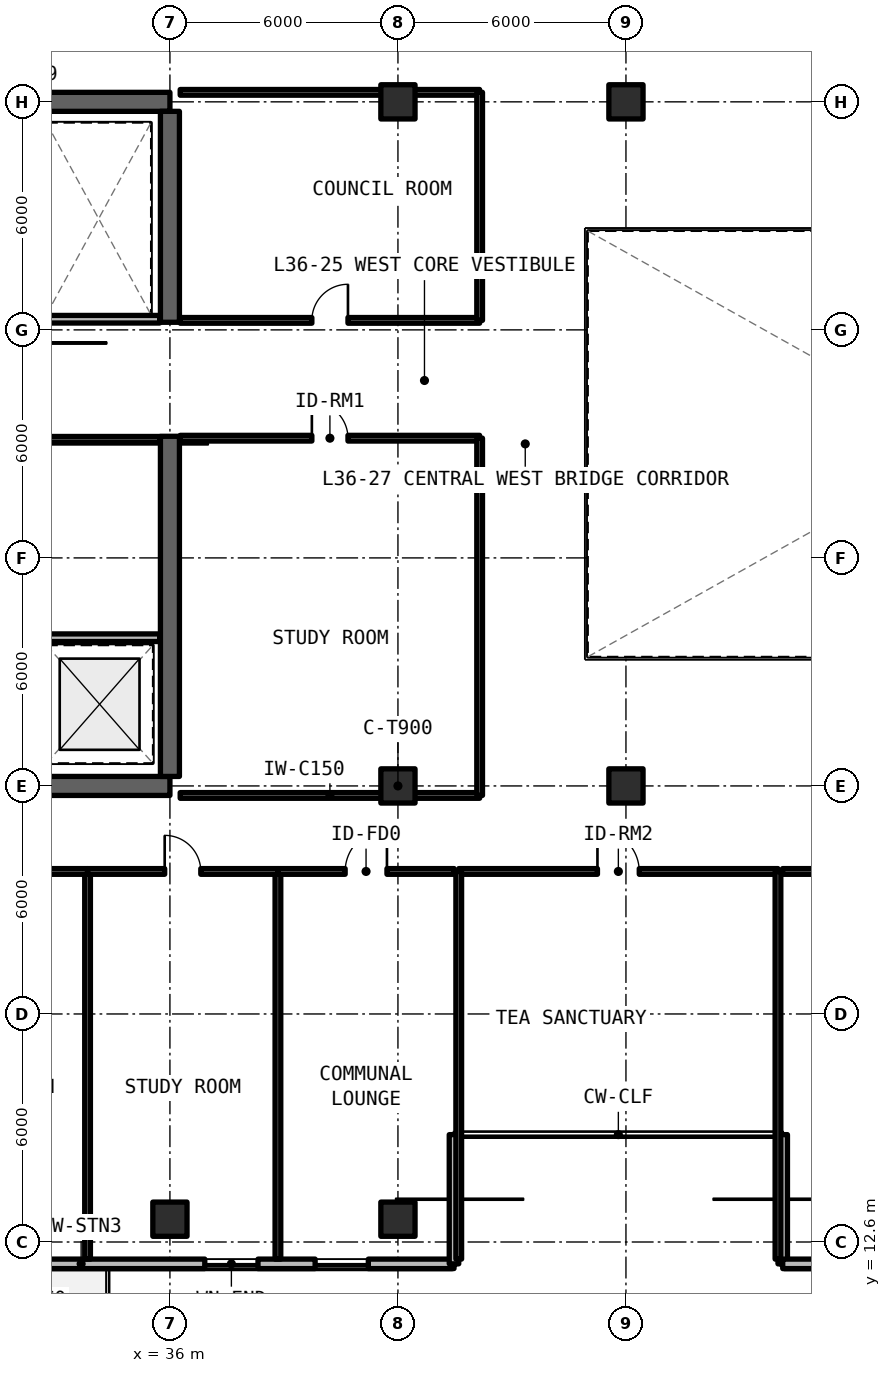
"""IFC4 building model, lengths in metres.
Left out: names, types, materials, properties, quantities, classifications, styles, units other than length and angle.
Written with IfcOpenShell. Run it as: python <this file> out.ifc"""

import sys

from ifc_helpers import new_model, si_unit, direction, frame, frame_2d, origin, origin_2d, place, context, subcontext, project, spatial, rectangle, extrude, element, fill, save


model = new_model("IFC4")
c1 = context("Model", 3, precision=1e-05, world=origin(), true_north=direction((0.0, 1.0)))
c2 = subcontext(c1, "Body", "Model", "MODEL_VIEW")
j1 = project(units=[si_unit("LENGTHUNIT", "METRE"), si_unit("PLANEANGLEUNIT", "RADIAN")], contexts=[c1])
p1 = place(None, origin())
s1 = spatial("IfcSite", under=j1, at=p1, CompositionType="ELEMENT")
p2 = place(p1, origin())
s2 = spatial("IfcBuilding", under=s1, at=p2, CompositionType="ELEMENT")
p3 = place(p2, frame((0.0, 0.0, 132.0)))
s3 = spatial("IfcBuildingStorey", under=s2, at=p3, CompositionType="ELEMENT", Elevation=132.0)
for number, where, z_axis, x_axis in (
    (1, (24.0, 24.6, 0.0), (0.0, 0.0, 1.0), (1.0, 0.0, 0.0)),
    (2, (36.0, 42.6, 0.0), (0.0, 0.0, 1.0), (-1.0, 0.0, 0.0)),
):
    element("IfcWall", number, at=place(p3, frame(where, z_axis=z_axis, x_axis=x_axis)), inside=s3, PredefinedType="SHEAR", context=c2, shape_type="SweptSolid", body=[
        extrude(rectangle(XDim=12.0, YDim=0.5, at=frame_2d((6.0, 0.0))), origin(), (0.0, 0.0, 1.0), 3.3),
    ])
p4 = place(p3, frame((36.0, 24.85, 0.0), z_axis=(0.0, 0.0, 1.0), x_axis=(0.0, 1.0, 0.0)))
e3 = element("IfcWall", 3, at=p4, inside=s3, PredefinedType="SHEAR", context=c2, shape_type="SweptSolid", body=[
    extrude(rectangle(XDim=8.95, YDim=0.5, at=frame_2d((4.475, 0.0))), origin(), (0.0, 0.0, 1.0), 3.3),
])
p5 = place(p3, frame((36.0, 36.8, 0.0), z_axis=(0.0, 0.0, 1.0), x_axis=(0.0, 1.0, 0.0)))
e4 = element("IfcWall", 4, at=p5, inside=s3, PredefinedType="SHEAR", context=c2, shape_type="SweptSolid", body=[
    extrude(rectangle(XDim=5.55, YDim=0.5, at=frame_2d((2.775, 0.0))), origin(), (0.0, 0.0, 1.0), 3.3),
])
for number, where, z_axis, x_axis in (
    (5, (42.0, 24.6, 0.0), (0.0, 0.0, 1.0), (1.0, 0.0, 0.0)),
    (6, (42.0, 42.6, 0.0), (0.0, 0.0, 1.0), (1.0, 0.0, 0.0)),
    (7, (48.0, 24.6, 0.0), (0.0, 0.0, 1.0), (1.0, 0.0, 0.0)),
    (8, (48.0, 42.6, 0.0), (0.0, 0.0, 1.0), (1.0, 0.0, 0.0)),
    (9, (36.0, 13.2, 0.0), (0.0, 0.0, 1.0), (1.0, 0.0, 0.0)),
    (10, (42.0, 13.2, 0.0), (0.0, 0.0, 1.0), (1.0, 0.0, 0.0)),
):
    element("IfcColumn", number, at=place(p3, frame(where, z_axis=z_axis, x_axis=x_axis)), inside=s3, PredefinedType="COLUMN", context=c2, shape_type="SweptSolid", body=[
        extrude(rectangle(XDim=0.9, YDim=0.9, at=origin_2d()), origin(), (0.0, 0.0, 1.0), 3.3),
    ])
p6 = place(p3, frame((23.852, 12.025, 0.0), z_axis=(0.0, 0.0, 1.0), x_axis=(1.0, 0.0, 0.0)))
e11 = element("IfcWall", 11, at=p6, inside=s3, PredefinedType="SOLIDWALL", context=c2, shape_type="SweptSolid", body=[
    extrude(rectangle(XDim=19.623, YDim=0.25, at=frame_2d((9.812, 0.0))), origin(), (0.0, 0.0, 1.0), 3.08),
])
p7 = place(p6, frame((3.148, 0.0, 0.0)))
e12 = element("IfcOpeningElement", 12, at=p7, cuts=e11, PredefinedType="OPENING", context=c2, shape_type="SweptSolid", body=[
    extrude(rectangle(XDim=1.1, YDim=2.15, at=frame_2d((0.55, 1.075))), frame((0.0, 0.135, 0.0), z_axis=(0.0, -1.0, 0.0), x_axis=(1.0, 0.0, 0.0)), (0.0, 0.0, 1.0), 0.27),
])
p8 = place(p6, frame((0.693, 0.0, 0.78)))
e13 = element("IfcOpeningElement", 13, at=p8, cuts=e11, PredefinedType="OPENING", context=c2, shape_type="SweptSolid", body=[
    extrude(rectangle(XDim=0.85, YDim=1.65, at=frame_2d((0.425, 0.825))), frame((0.0, 0.135, 0.0), z_axis=(0.0, -1.0, 0.0), x_axis=(1.0, 0.0, 0.0)), (0.0, 0.0, 1.0), 0.27),
])
p9 = place(p6, frame((6.989, 0.0, 0.78)))
e14 = element("IfcOpeningElement", 14, at=p9, cuts=e11, PredefinedType="OPENING", context=c2, shape_type="SweptSolid", body=[
    extrude(rectangle(XDim=1.8, YDim=1.66, at=frame_2d((0.9, 0.83))), frame((0.0, 0.135, 0.0), z_axis=(0.0, -1.0, 0.0), x_axis=(1.0, 0.0, 0.0)), (0.0, 0.0, 1.0), 0.27),
])
p10 = place(p6, frame((13.065, 0.0, 0.78)))
e15 = element("IfcOpeningElement", 15, at=p10, cuts=e11, PredefinedType="OPENING", context=c2, shape_type="SweptSolid", body=[
    extrude(rectangle(XDim=1.4, YDim=1.65, at=frame_2d((0.7, 0.825))), frame((0.0, 0.135, 0.0), z_axis=(0.0, -1.0, 0.0), x_axis=(1.0, 0.0, 0.0)), (0.0, 0.0, 1.0), 0.27),
])
p11 = place(p6, frame((15.969, 0.0, 0.78)))
e16 = element("IfcOpeningElement", 16, at=p11, cuts=e11, PredefinedType="OPENING", context=c2, shape_type="SweptSolid", body=[
    extrude(rectangle(XDim=1.4, YDim=1.65, at=frame_2d((0.7, 0.825))), frame((0.0, 0.135, 0.0), z_axis=(0.0, -1.0, 0.0), x_axis=(1.0, 0.0, 0.0)), (0.0, 0.0, 1.0), 0.27),
])
for number, where, z_axis, x_axis in (
    (17, (43.475, 12.025, 0.0), (0.0, 0.0, 1.0), (0.0, 1.0, 0.0)),
    (18, (52.125, 15.425, 0.0), (0.0, 0.0, 1.0), (0.0, -1.0, 0.0)),
):
    element("IfcWall", number, at=place(p3, frame(where, z_axis=z_axis, x_axis=x_axis)), inside=s3, PredefinedType="SOLIDWALL", context=c2, shape_type="SweptSolid", body=[
        extrude(rectangle(XDim=3.4, YDim=0.25, at=frame_2d((1.7, 0.0))), origin(), (0.0, 0.0, 1.0), 3.08),
    ])
p12 = place(p3, frame((52.125, 12.025, 0.0), z_axis=(0.0, 0.0, 1.0), x_axis=(1.0, 0.0, 0.0)))
e19 = element("IfcWall", 19, at=p12, inside=s3, PredefinedType="SOLIDWALL", context=c2, shape_type="SweptSolid", body=[
    extrude(rectangle(XDim=43.623, YDim=0.25, at=frame_2d((21.812, 0.0))), origin(), (0.0, 0.0, 1.0), 3.08),
])
p13 = place(p12, frame((10.925, 0.0, 0.0)))
e20 = element("IfcOpeningElement", 20, at=p13, cuts=e19, PredefinedType="OPENING", context=c2, shape_type="SweptSolid", body=[
    extrude(rectangle(XDim=1.1, YDim=2.15, at=frame_2d((0.55, 1.075))), frame((0.0, 0.135, 0.0), z_axis=(0.0, -1.0, 0.0), x_axis=(1.0, 0.0, 0.0)), (0.0, 0.0, 1.0), 0.27),
])
p14 = place(p12, frame((22.025, 0.0, 0.0)))
e21 = element("IfcOpeningElement", 21, at=p14, cuts=e19, PredefinedType="OPENING", context=c2, shape_type="SweptSolid", body=[
    extrude(rectangle(XDim=1.1, YDim=2.15, at=frame_2d((0.55, 1.075))), frame((0.0, 0.135, 0.0), z_axis=(0.0, -1.0, 0.0), x_axis=(1.0, 0.0, 0.0)), (0.0, 0.0, 1.0), 0.27),
])
p15 = place(p12, frame((2.738, 0.0, 0.78)))
e22 = element("IfcOpeningElement", 22, at=p15, cuts=e19, PredefinedType="OPENING", context=c2, shape_type="SweptSolid", body=[
    extrude(rectangle(XDim=1.8, YDim=1.66, at=frame_2d((0.9, 0.83))), frame((0.0, 0.135, 0.0), z_axis=(0.0, -1.0, 0.0), x_axis=(1.0, 0.0, 0.0)), (0.0, 0.0, 1.0), 0.27),
])
p16 = place(p12, frame((8.443, 0.0, 0.78)))
e23 = element("IfcOpeningElement", 23, at=p16, cuts=e19, PredefinedType="OPENING", context=c2, shape_type="SweptSolid", body=[
    extrude(rectangle(XDim=0.85, YDim=1.65, at=frame_2d((0.425, 0.825))), frame((0.0, 0.135, 0.0), z_axis=(0.0, -1.0, 0.0), x_axis=(1.0, 0.0, 0.0)), (0.0, 0.0, 1.0), 0.27),
])
p17 = place(p12, frame((14.879, 0.0, 0.78)))
e24 = element("IfcOpeningElement", 24, at=p17, cuts=e19, PredefinedType="OPENING", context=c2, shape_type="SweptSolid", body=[
    extrude(rectangle(XDim=0.85, YDim=1.65, at=frame_2d((0.425, 0.825))), frame((0.0, 0.135, 0.0), z_axis=(0.0, -1.0, 0.0), x_axis=(1.0, 0.0, 0.0)), (0.0, 0.0, 1.0), 0.27),
])
p18 = place(p12, frame((17.184, 0.0, 0.78)))
e25 = element("IfcOpeningElement", 25, at=p18, cuts=e19, PredefinedType="OPENING", context=c2, shape_type="SweptSolid", body=[
    extrude(rectangle(XDim=1.8, YDim=1.66, at=frame_2d((0.9, 0.83))), frame((0.0, 0.135, 0.0), z_axis=(0.0, -1.0, 0.0), x_axis=(1.0, 0.0, 0.0)), (0.0, 0.0, 1.0), 0.27),
])
p19 = place(p12, frame((26.643, 0.0, 0.78)))
e26 = element("IfcOpeningElement", 26, at=p19, cuts=e19, PredefinedType="OPENING", context=c2, shape_type="SweptSolid", body=[
    extrude(rectangle(XDim=1.4, YDim=1.65, at=frame_2d((0.7, 0.825))), frame((0.0, 0.135, 0.0), z_axis=(0.0, -1.0, 0.0), x_axis=(1.0, 0.0, 0.0)), (0.0, 0.0, 1.0), 0.27),
])
p20 = place(p12, frame((32.777, 0.0, 0.78)))
e27 = element("IfcOpeningElement", 27, at=p20, cuts=e19, PredefinedType="OPENING", context=c2, shape_type="SweptSolid", body=[
    extrude(rectangle(XDim=1.8, YDim=1.66, at=frame_2d((0.9, 0.83))), frame((0.0, 0.135, 0.0), z_axis=(0.0, -1.0, 0.0), x_axis=(1.0, 0.0, 0.0)), (0.0, 0.0, 1.0), 0.27),
])
p21 = place(p12, frame((38.836, 0.0, 0.78)))
e28 = element("IfcOpeningElement", 28, at=p21, cuts=e19, PredefinedType="OPENING", context=c2, shape_type="SweptSolid", body=[
    extrude(rectangle(XDim=1.8, YDim=1.66, at=frame_2d((0.9, 0.83))), frame((0.0, 0.135, 0.0), z_axis=(0.0, -1.0, 0.0), x_axis=(1.0, 0.0, 0.0)), (0.0, 0.0, 1.0), 0.27),
])
p22 = place(p3, frame((28.22, 28.5, 0.0), z_axis=(0.0, 0.0, 1.0), x_axis=(1.0, 0.0, 0.0)))
e29 = element("IfcWall", 29, at=p22, inside=s3, PredefinedType="SOLIDWALL", context=c2, shape_type="SweptSolid", body=[
    extrude(rectangle(XDim=7.51, YDim=0.2, at=frame_2d((3.755, 0.0))), origin(), (0.0, 0.0, 1.0), 2.35),
])
p23 = place(p22, frame((2.98, 0.0, 0.0)))
e30 = element("IfcOpeningElement", 30, at=p23, cuts=e29, PredefinedType="OPENING", context=c2, shape_type="SweptSolid", body=[
    extrude(rectangle(XDim=1.0, YDim=2.15, at=frame_2d((0.5, 1.075))), frame((0.0, 0.11, 0.0), z_axis=(0.0, -1.0, 0.0), x_axis=(1.0, 0.0, 0.0)), (0.0, 0.0, 1.0), 0.22),
])
p24 = place(p3, frame((32.68, 33.72, 0.0), z_axis=(0.0, 0.0, 1.0), x_axis=(1.0, 0.0, 0.0)))
e31 = element("IfcWall", 31, at=p24, inside=s3, PredefinedType="SOLIDWALL", context=c2, shape_type="SweptSolid", body=[
    extrude(rectangle(XDim=3.05, YDim=0.15, at=frame_2d((1.525, 0.0))), origin(), (0.0, 0.0, 1.0), 2.35),
])
p25 = place(p3, frame((32.68, 36.88, 0.0), z_axis=(0.0, 0.0, 1.0), x_axis=(1.0, 0.0, 0.0)))
e32 = element("IfcWall", 32, at=p25, inside=s3, PredefinedType="SOLIDWALL", context=c2, shape_type="SweptSolid", body=[
    extrude(rectangle(XDim=3.05, YDim=0.2, at=frame_2d((1.525, 0.0))), origin(), (0.0, 0.0, 1.0), 2.35),
])
p26 = place(p3, frame((36.27, 24.35, 0.0), z_axis=(0.0, 0.0, 1.0), x_axis=(1.0, 0.0, 0.0)))
e33 = element("IfcWall", 33, at=p26, inside=s3, PredefinedType="SOLIDWALL", context=c2, shape_type="SweptSolid", body=[
    extrude(rectangle(XDim=7.88, YDim=0.15, at=frame_2d((3.94, 0.0))), origin(), (0.0, 0.0, 1.0), 2.35),
])
p27 = place(p3, frame((36.27, 33.75, 0.0), z_axis=(0.0, 0.0, 1.0), x_axis=(1.0, 0.0, 0.0)))
e34 = element("IfcWall", 34, at=p27, inside=s3, PredefinedType="SOLIDWALL", context=c2, shape_type="SweptSolid", body=[
    extrude(rectangle(XDim=7.88, YDim=0.15, at=frame_2d((3.94, 0.0))), origin(), (0.0, 0.0, 1.0), 2.35),
])
p28 = place(p27, frame((3.465, 0.0, 0.0)))
e35 = element("IfcOpeningElement", 35, at=p28, cuts=e34, PredefinedType="OPENING", context=c2, shape_type="SweptSolid", body=[
    extrude(rectangle(XDim=0.95, YDim=2.15, at=frame_2d((0.475, 1.075))), frame((0.0, 0.085, 0.0), z_axis=(0.0, -1.0, 0.0), x_axis=(1.0, 0.0, 0.0)), (0.0, 0.0, 1.0), 0.17),
])
p29 = place(p3, frame((44.15, 24.35, 0.0), z_axis=(0.0, 0.0, 1.0), x_axis=(0.0, 1.0, 0.0)))
e36 = element("IfcWall", 36, at=p29, inside=s3, PredefinedType="SOLIDWALL", context=c2, shape_type="SweptSolid", body=[
    extrude(rectangle(XDim=9.4, YDim=0.15, at=frame_2d((4.7, 0.0))), origin(), (0.0, 0.0, 1.0), 2.35),
])
p30 = place(p3, frame((36.27, 36.85, 0.0), z_axis=(0.0, 0.0, 1.0), x_axis=(1.0, 0.0, 0.0)))
e37 = element("IfcWall", 37, at=p30, inside=s3, PredefinedType="SOLIDWALL", context=c2, shape_type="SweptSolid", body=[
    extrude(rectangle(XDim=7.88, YDim=0.15, at=frame_2d((3.94, 0.0))), origin(), (0.0, 0.0, 1.0), 2.35),
])
p31 = place(p30, frame((3.465, 0.0, 0.0)))
e38 = element("IfcOpeningElement", 38, at=p31, cuts=e37, PredefinedType="OPENING", context=c2, shape_type="SweptSolid", body=[
    extrude(rectangle(XDim=0.95, YDim=2.15, at=frame_2d((0.475, 1.075))), frame((0.0, 0.085, 0.0), z_axis=(0.0, -1.0, 0.0), x_axis=(1.0, 0.0, 0.0)), (0.0, 0.0, 1.0), 0.17),
])
p32 = place(p3, frame((36.27, 42.85, 0.0), z_axis=(0.0, 0.0, 1.0), x_axis=(1.0, 0.0, 0.0)))
e39 = element("IfcWall", 39, at=p32, inside=s3, PredefinedType="SOLIDWALL", context=c2, shape_type="SweptSolid", body=[
    extrude(rectangle(XDim=7.88, YDim=0.15, at=frame_2d((3.94, 0.0))), origin(), (0.0, 0.0, 1.0), 2.35),
])
p33 = place(p3, frame((44.15, 36.85, 0.0), z_axis=(0.0, 0.0, 1.0), x_axis=(0.0, 1.0, 0.0)))
e40 = element("IfcWall", 40, at=p33, inside=s3, PredefinedType="SOLIDWALL", context=c2, shape_type="SweptSolid", body=[
    extrude(rectangle(XDim=6.0, YDim=0.15, at=frame_2d((3.0, 0.0))), origin(), (0.0, 0.0, 1.0), 2.35),
])
p34 = place(p3, frame((43.6, 22.35, 0.0), z_axis=(0.0, 0.0, 1.0), x_axis=(1.0, 0.0, 0.0)))
e41 = element("IfcWall", 41, at=p34, inside=s3, PredefinedType="SOLIDWALL", context=c2, shape_type="SweptSolid", body=[
    extrude(rectangle(XDim=8.4, YDim=0.15, at=frame_2d((4.2, 0.0))), origin(), (0.0, 0.0, 1.0), 2.35),
])
p35 = place(p34, frame((3.65, 0.0, 0.0)))
e42 = element("IfcOpeningElement", 42, at=p35, cuts=e41, PredefinedType="OPENING", context=c2, shape_type="SweptSolid", body=[
    extrude(rectangle(XDim=1.1, YDim=2.15, at=frame_2d((0.55, 1.075))), frame((0.0, 0.085, 0.0), z_axis=(0.0, -1.0, 0.0), x_axis=(1.0, 0.0, 0.0)), (0.0, 0.0, 1.0), 0.17),
])
for number, where, z_axis, x_axis in (
    (43, (43.6, 12.15, 0.0), (0.0, 0.0, 1.0), (0.0, 1.0, 0.0)),
    (44, (52.0, 12.15, 0.0), (0.0, 0.0, 1.0), (0.0, 1.0, 0.0)),
    (45, (33.833, 12.15, 0.0), (0.0, 0.0, 1.0), (0.0, 1.0, 0.0)),
):
    element("IfcWall", number, at=place(p3, frame(where, z_axis=z_axis, x_axis=x_axis)), inside=s3, PredefinedType="SOLIDWALL", context=c2, shape_type="SweptSolid", body=[
        extrude(rectangle(XDim=10.2, YDim=0.15, at=frame_2d((5.1, 0.0))), origin(), (0.0, 0.0, 1.0), 2.35),
    ])
p36 = place(p3, frame((29.009, 22.35, 0.0), z_axis=(0.0, 0.0, 1.0), x_axis=(1.0, 0.0, 0.0)))
e46 = element("IfcWall", 46, at=p36, inside=s3, PredefinedType="SOLIDWALL", context=c2, shape_type="SweptSolid", body=[
    extrude(rectangle(XDim=4.824, YDim=0.15, at=frame_2d((2.412, 0.0))), origin(), (0.0, 0.0, 1.0), 2.35),
])
p37 = place(p36, frame((1.937, 0.0, 0.0)))
e47 = element("IfcOpeningElement", 47, at=p37, cuts=e46, PredefinedType="OPENING", context=c2, shape_type="SweptSolid", body=[
    extrude(rectangle(XDim=0.95, YDim=2.15, at=frame_2d((0.475, 1.075))), frame((0.0, 0.085, 0.0), z_axis=(0.0, -1.0, 0.0), x_axis=(1.0, 0.0, 0.0)), (0.0, 0.0, 1.0), 0.17),
])
p38 = place(p3, frame((38.842, 12.15, 0.0), z_axis=(0.0, 0.0, 1.0), x_axis=(0.0, 1.0, 0.0)))
e48 = element("IfcWall", 48, at=p38, inside=s3, PredefinedType="SOLIDWALL", context=c2, shape_type="SweptSolid", body=[
    extrude(rectangle(XDim=10.2, YDim=0.15, at=frame_2d((5.1, 0.0))), origin(), (0.0, 0.0, 1.0), 2.35),
])
p39 = place(p3, frame((33.833, 22.35, 0.0), z_axis=(0.0, 0.0, 1.0), x_axis=(1.0, 0.0, 0.0)))
e49 = element("IfcWall", 49, at=p39, inside=s3, PredefinedType="SOLIDWALL", context=c2, shape_type="SweptSolid", body=[
    extrude(rectangle(XDim=5.009, YDim=0.15, at=frame_2d((2.504, 0.0))), origin(), (0.0, 0.0, 1.0), 2.35),
])
p40 = place(p39, frame((2.03, 0.0, 0.0)))
e50 = element("IfcOpeningElement", 50, at=p40, cuts=e49, PredefinedType="OPENING", context=c2, shape_type="SweptSolid", body=[
    extrude(rectangle(XDim=0.95, YDim=2.15, at=frame_2d((0.475, 1.075))), frame((0.0, 0.085, 0.0), z_axis=(0.0, -1.0, 0.0), x_axis=(1.0, 0.0, 0.0)), (0.0, 0.0, 1.0), 0.17),
])
p41 = place(p3, frame((38.842, 22.35, 0.0), z_axis=(0.0, 0.0, 1.0), x_axis=(1.0, 0.0, 0.0)))
e51 = element("IfcWall", 51, at=p41, inside=s3, PredefinedType="SOLIDWALL", context=c2, shape_type="SweptSolid", body=[
    extrude(rectangle(XDim=4.638, YDim=0.15, at=frame_2d((2.319, 0.0))), origin(), (0.0, 0.0, 1.0), 2.35),
])
p42 = place(p41, frame((1.769, 0.0, 0.0)))
e52 = element("IfcOpeningElement", 52, at=p42, cuts=e51, PredefinedType="OPENING", context=c2, shape_type="SweptSolid", body=[
    extrude(rectangle(XDim=1.1, YDim=2.15, at=frame_2d((0.55, 1.075))), frame((0.0, 0.085, 0.0), z_axis=(0.0, -1.0, 0.0), x_axis=(1.0, 0.0, 0.0)), (0.0, 0.0, 1.0), 0.17),
])
p43 = place(p3, frame((52.12, 22.35, 0.0), z_axis=(0.0, 0.0, 1.0), x_axis=(1.0, 0.0, 0.0)))
e53 = element("IfcWall", 53, at=p43, inside=s3, PredefinedType="SOLIDWALL", context=c2, shape_type="SweptSolid", body=[
    extrude(rectangle(XDim=6.646, YDim=0.15, at=frame_2d((3.323, 0.0))), origin(), (0.0, 0.0, 1.0), 2.35),
])
p44 = place(p43, frame((2.848, 0.0, 0.0)))
e54 = element("IfcOpeningElement", 54, at=p44, cuts=e53, PredefinedType="OPENING", context=c2, shape_type="SweptSolid", body=[
    extrude(rectangle(XDim=0.95, YDim=2.15, at=frame_2d((0.475, 1.075))), frame((0.0, 0.085, 0.0), z_axis=(0.0, -1.0, 0.0), x_axis=(1.0, 0.0, 0.0)), (0.0, 0.0, 1.0), 0.17),
])
p45 = place(p10, origin())
e55 = element("IfcWindow", 55, at=p45, inside=s3, PartitioningType="SINGLE_PANEL", PredefinedType="WINDOW", context=c2, shape_type="SweptSolid", body=[
    extrude(rectangle(XDim=1.4, YDim=1.65, at=frame_2d((0.7, 0.825))), frame((0.0, 0.03, 0.0), z_axis=(0.0, -1.0, 0.0), x_axis=(1.0, 0.0, 0.0)), (0.0, 0.0, 1.0), 0.06),
])
fill(e15, e55)
p46 = place(p11, origin())
e56 = element("IfcWindow", 56, at=p46, inside=s3, PartitioningType="SINGLE_PANEL", PredefinedType="WINDOW", context=c2, shape_type="SweptSolid", body=[
    extrude(rectangle(XDim=1.4, YDim=1.65, at=frame_2d((0.7, 0.825))), frame((0.0, 0.03, 0.0), z_axis=(0.0, -1.0, 0.0), x_axis=(1.0, 0.0, 0.0)), (0.0, 0.0, 1.0), 0.06),
])
fill(e16, e56)
p47 = place(p28, origin())
e57 = element("IfcDoor", 57, at=p47, inside=s3, OperationType="SINGLE_SWING_LEFT", PredefinedType="DOOR", context=c2, shape_type="SweptSolid", body=[
    extrude(rectangle(XDim=0.95, YDim=2.15, at=frame_2d((0.475, 1.075))), frame((0.0, 0.025, 0.0), z_axis=(0.0, -1.0, 0.0), x_axis=(1.0, 0.0, 0.0)), (0.0, 0.0, 1.0), 0.05),
])
fill(e35, e57)
p48 = place(p31, origin())
e58 = element("IfcDoor", 58, at=p48, inside=s3, OperationType="SINGLE_SWING_RIGHT", PredefinedType="DOOR", context=c2, shape_type="SweptSolid", body=[
    extrude(rectangle(XDim=0.95, YDim=2.15, at=frame_2d((0.475, 1.075))), frame((0.0, 0.025, 0.0), z_axis=(0.0, -1.0, 0.0), x_axis=(1.0, 0.0, 0.0)), (0.0, 0.0, 1.0), 0.05),
])
fill(e38, e58)
p49 = place(p35, origin())
e59 = element("IfcDoor", 59, at=p49, inside=s3, OperationType="SINGLE_SWING_LEFT", PredefinedType="DOOR", context=c2, shape_type="SweptSolid", body=[
    extrude(rectangle(XDim=1.1, YDim=2.15, at=frame_2d((0.55, 1.075))), frame((0.0, 0.025, 0.0), z_axis=(0.0, -1.0, 0.0), x_axis=(1.0, 0.0, 0.0)), (0.0, 0.0, 1.0), 0.05),
])
fill(e42, e59)
p50 = place(p40, origin())
e60 = element("IfcDoor", 60, at=p50, inside=s3, OperationType="SINGLE_SWING_LEFT", PredefinedType="DOOR", context=c2, shape_type="SweptSolid", body=[
    extrude(rectangle(XDim=0.95, YDim=2.15, at=frame_2d((0.475, 1.075))), frame((0.0, 0.025, 0.0), z_axis=(0.0, -1.0, 0.0), x_axis=(1.0, 0.0, 0.0)), (0.0, 0.0, 1.0), 0.05),
])
fill(e50, e60)
p51 = place(p42, origin())
e61 = element("IfcDoor", 61, at=p51, inside=s3, OperationType="SINGLE_SWING_RIGHT", PredefinedType="DOOR", context=c2, shape_type="SweptSolid", body=[
    extrude(rectangle(XDim=1.1, YDim=2.15, at=frame_2d((0.55, 1.075))), frame((0.0, 0.025, 0.0), z_axis=(0.0, -1.0, 0.0), x_axis=(1.0, 0.0, 0.0)), (0.0, 0.0, 1.0), 0.05),
])
fill(e52, e61)
save(model, sys.argv[1])
